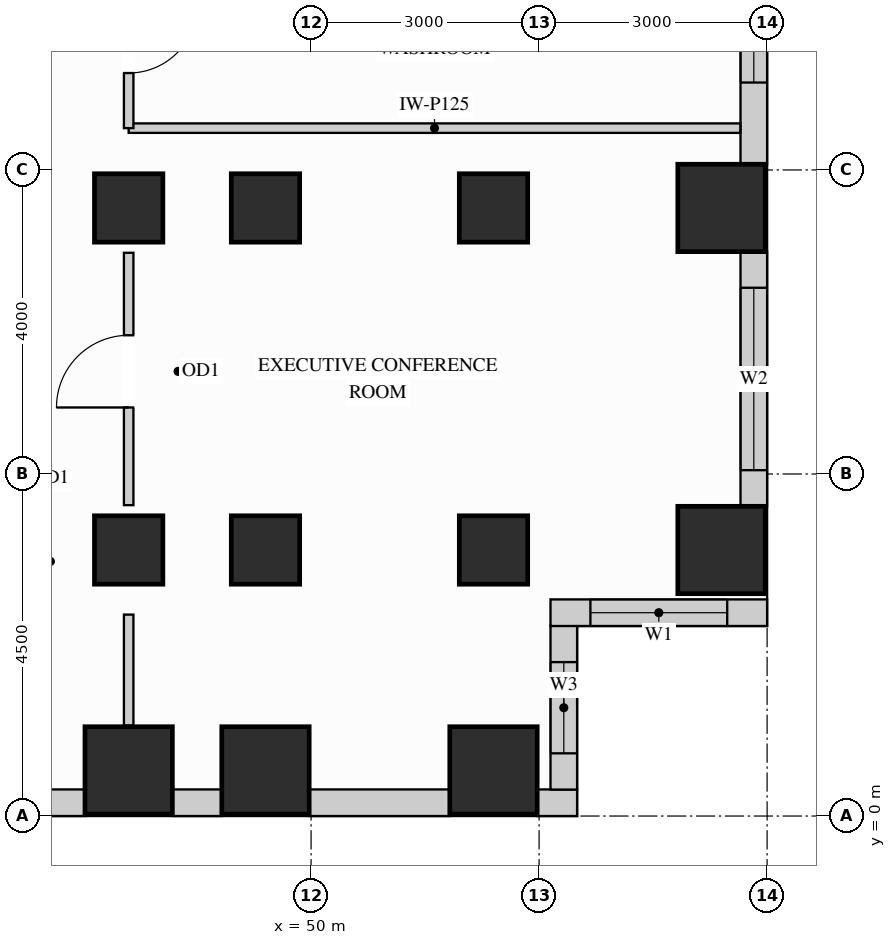
"""IFC4 building model, lengths in metres.
Left out: names, types, materials, properties, quantities, classifications, styles, units other than length and angle.
Written with IfcOpenShell. Run it as: python <this file> out.ifc"""

import sys

from ifc_helpers import new_model, si_unit, direction, frame, frame_2d, origin, origin_2d, place, context, subcontext, project, spatial, rectangle, extrude, source, transform, mapped, element, fill, save


model = new_model("IFC4")
c1 = context("Model", 3, precision=1e-05, world=origin(), true_north=direction((0.0, 1.0)))
c2 = subcontext(c1, "Body", "Model", "MODEL_VIEW")
j1 = project(units=[si_unit("LENGTHUNIT", "METRE"), si_unit("PLANEANGLEUNIT", "RADIAN")], contexts=[c1])
p1 = place(None, origin())
s1 = spatial("IfcSite", under=j1, at=p1, CompositionType="ELEMENT")
p2 = place(p1, origin())
s2 = spatial("IfcBuilding", under=s1, at=p2, CompositionType="ELEMENT")
p3 = place(p2, frame((0.0, 0.0, 99.0)))
s3 = spatial("IfcBuildingStorey", under=s2, at=p3, CompositionType="ELEMENT", Elevation=99.0)
m1 = source(origin(), c2, "Body", "SweptSolid", [
    extrude(rectangle(XDim=0.9, YDim=0.9, at=origin_2d()), origin(), (0.0, 0.0, 1.0), 3.38),
])
for number, where, z_axis, x_axis in (
    (1, (47.6, 3.5, 0.0), (0.0, 0.0, 1.0), (1.0, 0.0, 0.0)),
    (2, (47.6, 8.0, 0.0), (0.0, 0.0, 1.0), (1.0, 0.0, 0.0)),
    (3, (49.4, 3.5, 0.0), (0.0, 0.0, 1.0), (1.0, 0.0, 0.0)),
    (4, (49.4, 8.0, 0.0), (0.0, 0.0, 1.0), (1.0, 0.0, 0.0)),
    (5, (52.4, 3.5, 0.0), (0.0, 0.0, 1.0), (1.0, 0.0, 0.0)),
    (6, (52.4, 8.0, 0.0), (0.0, 0.0, 1.0), (1.0, 0.0, 0.0)),
):
    element("IfcColumn", number, at=place(p3, frame(where, z_axis=z_axis, x_axis=x_axis)), inside=s3, PredefinedType="COLUMN", context=c2, shape_type="MappedRepresentation", body=[
        mapped(m1, transform((0.0, 0.0, 0.0), x_axis=(1.0, 0.0, 0.0), y_axis=(0.0, 1.0, 0.0), z_axis=(0.0, 0.0, 1.0))),
    ])
m2 = source(origin(), c2, "Body", "SweptSolid", [
    extrude(rectangle(XDim=1.15, YDim=1.15, at=origin_2d()), origin(), (0.0, 0.0, 1.0), 3.38),
])
for number, where, z_axis, x_axis in (
    (7, (55.4, 3.5, 0.0), (0.0, 0.0, 1.0), (1.0, 0.0, 0.0)),
    (8, (55.4, 8.0, 0.0), (0.0, 0.0, 1.0), (1.0, 0.0, 0.0)),
    (9, (47.6, 0.6, 0.0), (0.0, 0.0, 1.0), (1.0, 0.0, 0.0)),
    (10, (49.4, 0.6, 0.0), (0.0, 0.0, 1.0), (1.0, 0.0, 0.0)),
    (11, (52.4, 0.6, 0.0), (0.0, 0.0, 1.0), (1.0, 0.0, 0.0)),
):
    element("IfcColumn", number, at=place(p3, frame(where, z_axis=z_axis, x_axis=x_axis)), inside=s3, PredefinedType="COLUMN", context=c2, shape_type="MappedRepresentation", body=[
        mapped(m2, transform((0.0, 0.0, 0.0), x_axis=(1.0, 0.0, 0.0), y_axis=(0.0, 1.0, 0.0), z_axis=(0.0, 0.0, 1.0))),
    ])
p4 = place(p3, frame((40.573, 0.175, 0.0), z_axis=(0.0, 0.0, 1.0), x_axis=(1.0, 0.0, 0.0)))
e12 = element("IfcWall", 12, at=p4, inside=s3, PredefinedType="SOLIDWALL", context=c2, shape_type="SweptSolid", body=[
    extrude(rectangle(XDim=6.454, YDim=0.35, at=frame_2d((3.227, 0.0))), origin(), (0.0, 0.0, 1.0), 3.365),
])
p5 = place(p4, frame((0.712, 0.0, 0.78)))
e13 = element("IfcOpeningElement", 13, at=p5, cuts=e12, PredefinedType="OPENING", context=c2, shape_type="SweptSolid", body=[
    extrude(rectangle(XDim=1.8, YDim=2.1, at=frame_2d((0.9, 1.05))), frame((0.0, 0.185, 0.0), z_axis=(0.0, -1.0, 0.0), x_axis=(1.0, 0.0, 0.0)), (0.0, 0.0, 1.0), 0.37),
])
p6 = place(p4, frame((2.905, 0.0, 0.78)))
e14 = element("IfcOpeningElement", 14, at=p6, cuts=e12, PredefinedType="OPENING", context=c2, shape_type="SweptSolid", body=[
    extrude(rectangle(XDim=1.8, YDim=2.1, at=frame_2d((0.9, 1.05))), frame((0.0, 0.185, 0.0), z_axis=(0.0, -1.0, 0.0), x_axis=(1.0, 0.0, 0.0)), (0.0, 0.0, 1.0), 0.37),
])
m3 = source(origin(), c2, "Body", "SweptSolid", [
    extrude(rectangle(XDim=0.654, YDim=0.35, at=frame_2d((0.327, 0.0))), origin(), (0.0, 0.0, 1.0), 3.365),
])
p7 = place(p3, frame((48.173, 0.175, 0.0), z_axis=(0.0, 0.0, 1.0), x_axis=(1.0, 0.0, 0.0)))
e15 = element("IfcWall", 15, at=p7, inside=s3, PredefinedType="SOLIDWALL", context=c2, shape_type="MappedRepresentation", body=[
    mapped(m3, transform((0.0, 0.0, 0.0), x_axis=(1.0, 0.0, 0.0), y_axis=(0.0, 1.0, 0.0), z_axis=(0.0, 0.0, 1.0))),
])
m4 = source(origin(), c2, "Body", "SweptSolid", [
    extrude(rectangle(XDim=1.854, YDim=0.35, at=frame_2d((0.927, 0.0))), origin(), (0.0, 0.0, 1.0), 3.365),
])
p8 = place(p3, frame((49.973, 0.175, 0.0), z_axis=(0.0, 0.0, 1.0), x_axis=(1.0, 0.0, 0.0)))
e16 = element("IfcWall", 16, at=p8, inside=s3, PredefinedType="SOLIDWALL", context=c2, shape_type="MappedRepresentation", body=[
    mapped(m4, transform((0.0, 0.0, 0.0), x_axis=(1.0, 0.0, 0.0), y_axis=(0.0, 1.0, 0.0), z_axis=(0.0, 0.0, 1.0))),
])
m5 = source(origin(), c2, "Body", "SweptSolid", [
    extrude(rectangle(XDim=0.527, YDim=0.35, at=frame_2d((0.264, 0.0))), origin(), (0.0, 0.0, 1.0), 3.365),
])
p9 = place(p3, frame((52.973, 0.175, 0.0), z_axis=(0.0, 0.0, 1.0), x_axis=(1.0, 0.0, 0.0)))
e17 = element("IfcWall", 17, at=p9, inside=s3, PredefinedType="SOLIDWALL", context=c2, shape_type="MappedRepresentation", body=[
    mapped(m5, transform((0.0, 0.0, 0.0), x_axis=(1.0, 0.0, 0.0), y_axis=(0.0, 1.0, 0.0), z_axis=(0.0, 0.0, 1.0))),
])
p10 = place(p3, frame((53.325, 0.348, 0.0), z_axis=(0.0, 0.0, 1.0), x_axis=(0.0, 1.0, 0.0)))
e18 = element("IfcWall", 18, at=p10, inside=s3, PredefinedType="SOLIDWALL", context=c2, shape_type="SweptSolid", body=[
    extrude(rectangle(XDim=2.154, YDim=0.35, at=frame_2d((1.077, 0.0))), origin(), (0.0, 0.0, 1.0), 3.365),
])
p11 = place(p10, frame((0.477, 0.0, 0.78)))
e19 = element("IfcOpeningElement", 19, at=p11, cuts=e18, PredefinedType="OPENING", context=c2, shape_type="SweptSolid", body=[
    extrude(rectangle(XDim=1.2, YDim=2.1, at=frame_2d((0.6, 1.05))), frame((0.0, 0.185, 0.0), z_axis=(0.0, -1.0, 0.0), x_axis=(1.0, 0.0, 0.0)), (0.0, 0.0, 1.0), 0.37),
])
p12 = place(p3, frame((53.15, 2.675, 0.0), z_axis=(0.0, 0.0, 1.0), x_axis=(1.0, 0.0, 0.0)))
e20 = element("IfcWall", 20, at=p12, inside=s3, PredefinedType="SOLIDWALL", context=c2, shape_type="SweptSolid", body=[
    extrude(rectangle(XDim=2.85, YDim=0.35, at=frame_2d((1.425, 0.0))), origin(), (0.0, 0.0, 1.0), 3.365),
])
p13 = place(p12, frame((0.525, 0.0, 0.78)))
e21 = element("IfcOpeningElement", 21, at=p13, cuts=e20, PredefinedType="OPENING", context=c2, shape_type="SweptSolid", body=[
    extrude(rectangle(XDim=1.8, YDim=2.1, at=frame_2d((0.9, 1.05))), frame((0.0, 0.185, 0.0), z_axis=(0.0, -1.0, 0.0), x_axis=(1.0, 0.0, 0.0)), (0.0, 0.0, 1.0), 0.37),
])
p14 = place(p3, frame((55.825, 4.073, 0.0), z_axis=(0.0, 0.0, 1.0), x_axis=(0.0, 1.0, 0.0)))
e22 = element("IfcWall", 22, at=p14, inside=s3, PredefinedType="SOLIDWALL", context=c2, shape_type="SweptSolid", body=[
    extrude(rectangle(XDim=3.354, YDim=0.35, at=frame_2d((1.677, 0.0))), origin(), (0.0, 0.0, 1.0), 3.365),
])
p15 = place(p14, frame((0.477, 0.0, 0.78)))
e23 = element("IfcOpeningElement", 23, at=p15, cuts=e22, PredefinedType="OPENING", context=c2, shape_type="SweptSolid", body=[
    extrude(rectangle(XDim=2.4, YDim=2.1, at=frame_2d((1.2, 1.05))), frame((0.0, 0.185, 0.0), z_axis=(0.0, -1.0, 0.0), x_axis=(1.0, 0.0, 0.0)), (0.0, 0.0, 1.0), 0.37),
])
p16 = place(p3, frame((55.825, 8.573, 0.0), z_axis=(0.0, 0.0, 1.0), x_axis=(0.0, 1.0, 0.0)))
e24 = element("IfcWall", 24, at=p16, inside=s3, PredefinedType="SOLIDWALL", context=c2, shape_type="SweptSolid", body=[
    extrude(rectangle(XDim=4.354, YDim=0.35, at=frame_2d((2.177, 0.0))), origin(), (0.0, 0.0, 1.0), 3.365),
])
p17 = place(p16, frame((1.077, 0.0, 0.78)))
e25 = element("IfcOpeningElement", 25, at=p17, cuts=e24, PredefinedType="OPENING", context=c2, shape_type="SweptSolid", body=[
    extrude(rectangle(XDim=1.2, YDim=2.1, at=frame_2d((0.6, 1.05))), frame((0.0, 0.185, 0.0), z_axis=(0.0, -1.0, 0.0), x_axis=(1.0, 0.0, 0.0)), (0.0, 0.0, 1.0), 0.37),
])
m6 = source(origin(), c2, "Body", "SweptSolid", [
    extrude(rectangle(XDim=8.048, YDim=0.125, at=frame_2d((4.024, 0.0))), origin(), (0.0, 0.0, 1.0), 3.365),
])
p18 = place(p3, frame((47.6, 9.05, 0.0), z_axis=(0.0, 0.0, 1.0), x_axis=(1.0, 0.0, 0.0)))
e26 = element("IfcWall", 26, at=p18, inside=s3, PredefinedType="PARTITIONING", context=c2, shape_type="MappedRepresentation", body=[
    mapped(m6, transform((0.0, 0.0, 0.0), x_axis=(1.0, 0.0, 0.0), y_axis=(0.0, 1.0, 0.0), z_axis=(0.0, 0.0, 1.0))),
])
p19 = place(p3, frame((47.6, 4.09, 0.0), z_axis=(0.0, 0.0, 1.0), x_axis=(0.0, 1.0, 0.0)))
e27 = element("IfcWall", 27, at=p19, inside=s3, PredefinedType="PARTITIONING", context=c2, shape_type="SweptSolid", body=[
    extrude(rectangle(XDim=3.32, YDim=0.125, at=frame_2d((1.66, 0.0))), origin(), (0.0, 0.0, 1.0), 2.677),
])
p20 = place(p19, frame((1.285, 0.0, 0.0)))
e28 = element("IfcOpeningElement", 28, at=p20, cuts=e27, PredefinedType="OPENING", context=c2, shape_type="SweptSolid", body=[
    extrude(rectangle(XDim=0.95, YDim=2.15, at=frame_2d((0.475, 1.075))), frame((0.0, 0.073, 0.0), z_axis=(0.0, -1.0, 0.0), x_axis=(1.0, 0.0, 0.0)), (0.0, 0.0, 1.0), 0.145),
])
m7 = source(origin(), c2, "Body", "SweptSolid", [
    extrude(rectangle(XDim=1.46, YDim=0.125, at=frame_2d((0.73, 0.0))), origin(), (0.0, 0.0, 1.0), 2.677),
])
p21 = place(p3, frame((47.6, 1.19, 0.0), z_axis=(0.0, 0.0, 1.0), x_axis=(0.0, 1.0, 0.0)))
e29 = element("IfcWall", 29, at=p21, inside=s3, PredefinedType="PARTITIONING", context=c2, shape_type="MappedRepresentation", body=[
    mapped(m7, transform((0.0, 0.0, 0.0), x_axis=(1.0, 0.0, 0.0), y_axis=(0.0, 1.0, 0.0), z_axis=(0.0, 0.0, 1.0))),
])
p22 = place(p3, frame((47.6, 9.05, 0.0), z_axis=(0.0, 0.0, 1.0), x_axis=(0.0, 1.0, 0.0)))
e30 = element("IfcWall", 30, at=p22, inside=s3, PredefinedType="PARTITIONING", context=c2, shape_type="SweptSolid", body=[
    extrude(rectangle(XDim=2.4, YDim=0.125, at=frame_2d((1.2, 0.0))), origin(), (0.0, 0.0, 1.0), 2.677),
])
p23 = place(p22, frame((0.725, 0.0, 0.0)))
e31 = element("IfcOpeningElement", 31, at=p23, cuts=e30, PredefinedType="OPENING", context=c2, shape_type="SweptSolid", body=[
    extrude(rectangle(XDim=0.9, YDim=2.15, at=frame_2d((0.45, 1.075))), frame((0.0, 0.073, 0.0), z_axis=(0.0, -1.0, 0.0), x_axis=(1.0, 0.0, 0.0)), (0.0, 0.0, 1.0), 0.145),
])
m8 = source(origin(), c2, "Body", "SweptSolid", [
    extrude(rectangle(XDim=0.95, YDim=2.15, at=frame_2d((0.475, 1.075))), frame((0.0, 0.025, 0.0), z_axis=(0.0, -1.0, 0.0), x_axis=(1.0, 0.0, 0.0)), (0.0, 0.0, 1.0), 0.05),
])
p24 = place(p20, origin())
e32 = element("IfcDoor", 32, at=p24, inside=s3, OperationType="SINGLE_SWING_LEFT", PredefinedType="DOOR", context=c2, shape_type="MappedRepresentation", body=[
    mapped(m8, transform((0.0, 0.0, 0.0), x_axis=(1.0, 0.0, 0.0), y_axis=(0.0, 1.0, 0.0), z_axis=(0.0, 0.0, 1.0))),
])
fill(e28, e32)
m9 = source(origin(), c2, "Body", "SweptSolid", [
    extrude(rectangle(XDim=0.9, YDim=2.15, at=frame_2d((0.45, 1.075))), frame((0.0, 0.025, 0.0), z_axis=(0.0, -1.0, 0.0), x_axis=(1.0, 0.0, 0.0)), (0.0, 0.0, 1.0), 0.05),
])
p25 = place(p23, origin())
e33 = element("IfcDoor", 33, at=p25, inside=s3, OperationType="SINGLE_SWING_RIGHT", PredefinedType="DOOR", context=c2, shape_type="MappedRepresentation", body=[
    mapped(m9, transform((0.0, 0.0, 0.0), x_axis=(1.0, 0.0, 0.0), y_axis=(0.0, 1.0, 0.0), z_axis=(0.0, 0.0, 1.0))),
])
fill(e31, e33)
m10 = source(origin(), c2, "Body", "SweptSolid", [
    extrude(rectangle(XDim=1.8, YDim=2.1, at=frame_2d((0.9, 1.05))), frame((0.0, 0.03, 0.0), z_axis=(0.0, -1.0, 0.0), x_axis=(1.0, 0.0, 0.0)), (0.0, 0.0, 1.0), 0.06),
])
p26 = place(p13, origin())
e34 = element("IfcWindow", 34, at=p26, inside=s3, PartitioningType="SINGLE_PANEL", PredefinedType="WINDOW", context=c2, shape_type="MappedRepresentation", body=[
    mapped(m10, transform((0.0, 0.0, 0.0), x_axis=(1.0, 0.0, 0.0), y_axis=(0.0, 1.0, 0.0), z_axis=(0.0, 0.0, 1.0))),
])
fill(e21, e34)
m11 = source(origin(), c2, "Body", "SweptSolid", [
    extrude(rectangle(XDim=2.4, YDim=2.1, at=frame_2d((1.2, 1.05))), frame((0.0, 0.03, 0.0), z_axis=(0.0, -1.0, 0.0), x_axis=(1.0, 0.0, 0.0)), (0.0, 0.0, 1.0), 0.06),
])
p27 = place(p15, origin())
e35 = element("IfcWindow", 35, at=p27, inside=s3, PartitioningType="SINGLE_PANEL", PredefinedType="WINDOW", context=c2, shape_type="MappedRepresentation", body=[
    mapped(m11, transform((0.0, 0.0, 0.0), x_axis=(1.0, 0.0, 0.0), y_axis=(0.0, 1.0, 0.0), z_axis=(0.0, 0.0, 1.0))),
])
fill(e23, e35)
m12 = source(origin(), c2, "Body", "SweptSolid", [
    extrude(rectangle(XDim=1.2, YDim=2.1, at=frame_2d((0.6, 1.05))), frame((0.0, 0.03, 0.0), z_axis=(0.0, -1.0, 0.0), x_axis=(1.0, 0.0, 0.0)), (0.0, 0.0, 1.0), 0.06),
])
p28 = place(p11, origin())
e36 = element("IfcWindow", 36, at=p28, inside=s3, PartitioningType="SINGLE_PANEL", PredefinedType="WINDOW", context=c2, shape_type="MappedRepresentation", body=[
    mapped(m12, transform((0.0, 0.0, 0.0), x_axis=(1.0, 0.0, 0.0), y_axis=(0.0, 1.0, 0.0), z_axis=(0.0, 0.0, 1.0))),
])
fill(e19, e36)
p29 = place(p17, origin())
e37 = element("IfcWindow", 37, at=p29, inside=s3, PartitioningType="SINGLE_PANEL", PredefinedType="WINDOW", context=c2, shape_type="MappedRepresentation", body=[
    mapped(m12, transform((0.0, 0.0, 0.0), x_axis=(1.0, 0.0, 0.0), y_axis=(0.0, 1.0, 0.0), z_axis=(0.0, 0.0, 1.0))),
])
fill(e25, e37)
save(model, sys.argv[1])
